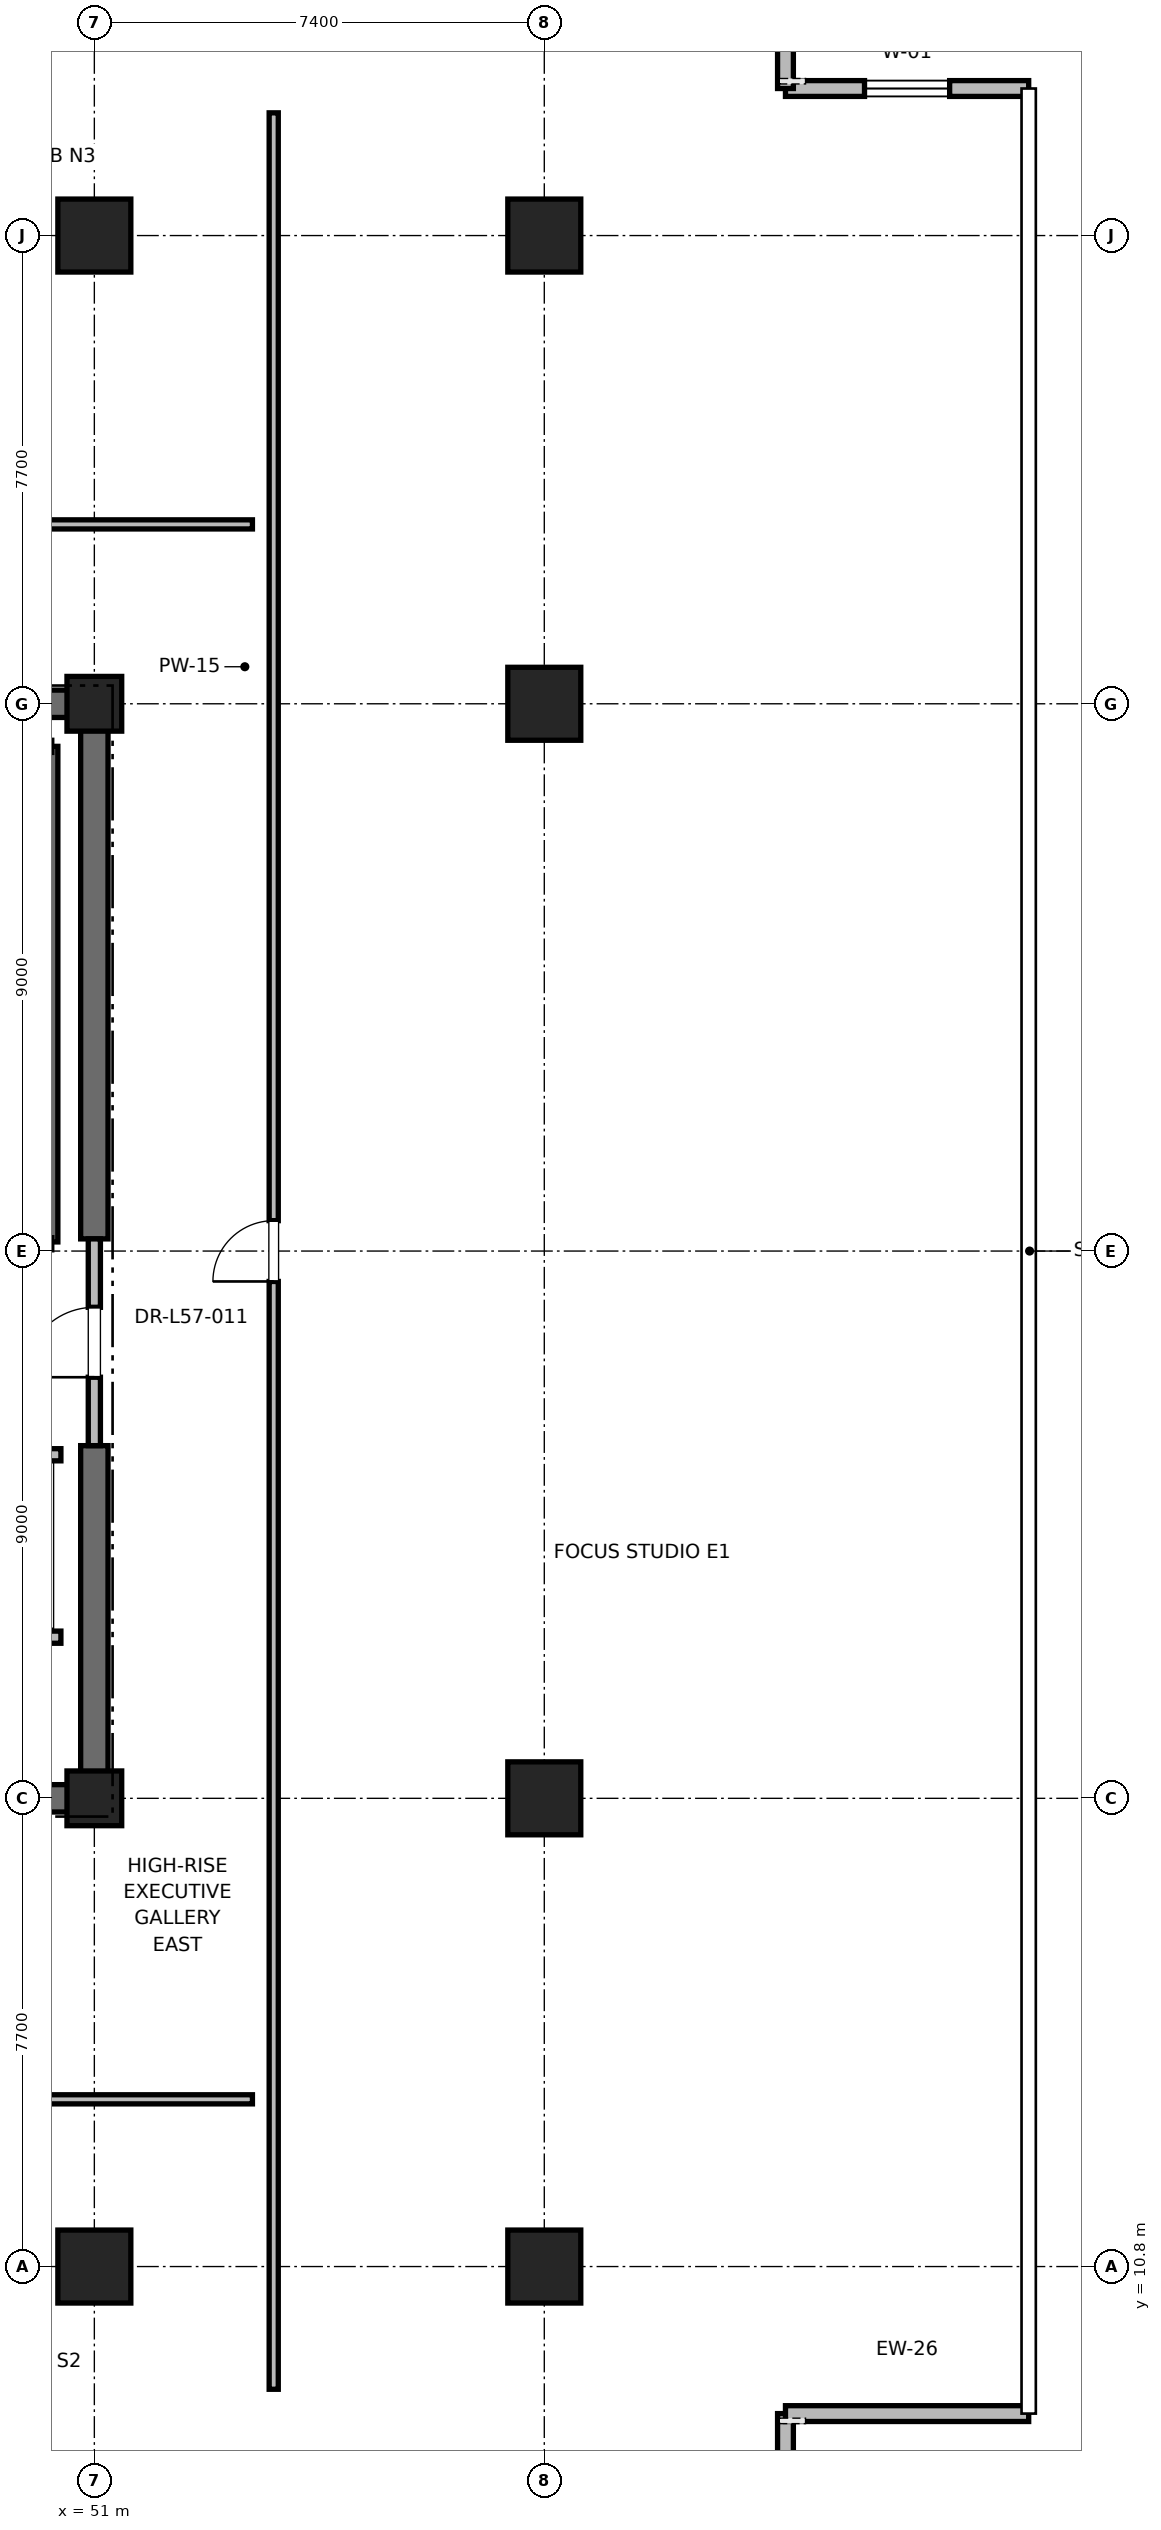
"""IFC4 building model, lengths in metres.
Left out: names, types, materials, properties, quantities, classifications, styles, units other than length and angle.
Written with IfcOpenShell. Run it as: python <this file> out.ifc"""

import sys

from ifc_helpers import new_model, si_unit, direction, frame, frame_2d, origin, origin_2d, place, context, subcontext, project, spatial, rectangle, extrude, element, fill, save


model = new_model("IFC4")
c1 = context("Model", 3, precision=1e-05, world=origin(), true_north=direction((0.0, 1.0)))
c2 = subcontext(c1, "Body", "Model", "MODEL_VIEW")
j1 = project(units=[si_unit("LENGTHUNIT", "METRE"), si_unit("PLANEANGLEUNIT", "RADIAN")], contexts=[c1])
p1 = place(None, origin())
s1 = spatial("IfcSite", under=j1, at=p1, CompositionType="ELEMENT")
p2 = place(p1, origin())
s2 = spatial("IfcBuilding", under=s1, at=p2, CompositionType="ELEMENT")
p3 = place(p2, frame((0.0, 0.0, 247.2)))
s3 = spatial("IfcBuildingStorey", under=s2, at=p3, CompositionType="ELEMENT", Elevation=247.2)
for number, where, z_axis, x_axis in (
    (1, (51.0, 10.8, 0.0), (0.0, 0.0, 1.0), (1.0, 0.0, 0.0)),
    (2, (51.0, 44.2, 0.0), (0.0, 0.0, 1.0), (1.0, 0.0, 0.0)),
    (3, (58.4, 18.5, 0.0), (0.0, 0.0, 1.0), (1.0, 0.0, 0.0)),
    (4, (58.4, 36.5, 0.0), (0.0, 0.0, 1.0), (1.0, 0.0, 0.0)),
    (5, (58.4, 10.8, 0.0), (0.0, 0.0, 1.0), (1.0, 0.0, 0.0)),
    (6, (58.4, 44.2, 0.0), (0.0, 0.0, 1.0), (1.0, 0.0, 0.0)),
):
    element("IfcColumn", number, at=place(p3, frame(where, z_axis=z_axis, x_axis=x_axis)), inside=s3, PredefinedType="COLUMN", context=c2, shape_type="SweptSolid", body=[
        extrude(rectangle(XDim=1.2, YDim=1.2, at=origin_2d()), origin(), (0.0, 0.0, 1.0), 4.0),
    ])
for number, where, z_axis, x_axis in (
    (7, (51.0, 18.5, 0.0), (0.0, 0.0, 1.0), (1.0, 0.0, 0.0)),
    (8, (51.0, 36.5, 0.0), (0.0, 0.0, 1.0), (1.0, 0.0, 0.0)),
):
    element("IfcColumn", number, at=place(p3, frame(where, z_axis=z_axis, x_axis=x_axis)), inside=s3, PredefinedType="PILASTER", context=c2, shape_type="SweptSolid", body=[
        extrude(rectangle(XDim=0.9, YDim=0.9, at=origin_2d()), origin(), (0.0, 0.0, 1.0), 4.0),
    ])
p4 = place(p3, frame((41.8, 18.5, 0.0), z_axis=(0.0, 0.0, 1.0), x_axis=(1.0, 0.0, 0.0)))
e9 = element("IfcWall", 9, at=p4, inside=s3, PredefinedType="SHEAR", context=c2, shape_type="SweptSolid", body=[
    extrude(rectangle(XDim=9.2, YDim=0.45, at=frame_2d((4.6, 0.0))), origin(), (0.0, 0.0, 1.0), 3.785),
])
for number, where, z_axis, x_axis in (
    (10, (45.2, 36.5, 0.0), (0.0, 0.0, 1.0), (1.0, 0.0, 0.0)),
    (11, (51.0, 18.5, 0.0), (0.0, 0.0, 1.0), (0.0, 1.0, 0.0)),
):
    element("IfcWall", number, at=place(p3, frame(where, z_axis=z_axis, x_axis=x_axis)), inside=s3, PredefinedType="SHEAR", context=c2, shape_type="SweptSolid", body=[
        extrude(rectangle(XDim=5.8, YDim=0.45, at=frame_2d((2.9, 0.0))), origin(), (0.0, 0.0, 1.0), 3.785),
    ])
p5 = place(p3, frame((51.0, 27.7, 0.0), z_axis=(0.0, 0.0, 1.0), x_axis=(0.0, 1.0, 0.0)))
e12 = element("IfcWall", 12, at=p5, inside=s3, PredefinedType="SHEAR", context=c2, shape_type="SweptSolid", body=[
    extrude(rectangle(XDim=8.8, YDim=0.45, at=frame_2d((4.4, 0.0))), origin(), (0.0, 0.0, 1.0), 3.785),
])
p6 = place(p3, frame((62.366, 4.882, 0.0), z_axis=(0.0, 0.0, 1.0), x_axis=(0.0, 1.0, 0.0)))
e13 = element("IfcWall", 13, at=p6, inside=s3, PredefinedType="PARAPET", context=c2, shape_type="SweptSolid", body=[
    extrude(rectangle(XDim=3.5, YDim=0.26, at=frame_2d((1.75, 0.0))), origin(), (0.0, 0.0, 1.0), 3.785),
])
p7 = place(p6, frame((1.05, 0.0, 0.85)))
e14 = element("IfcOpeningElement", 14, at=p7, cuts=e13, PredefinedType="OPENING", context=c2, shape_type="SweptSolid", body=[
    extrude(rectangle(XDim=1.4, YDim=2.0, at=frame_2d((0.7, 1.0))), frame((0.0, 0.13, 0.0), z_axis=(0.0, -1.0, 0.0), x_axis=(1.0, 0.0, 0.0)), (0.0, 0.0, 1.0), 0.26),
])
p8 = place(p3, frame((62.366, 8.382, 0.0), z_axis=(0.0, 0.0, 1.0), x_axis=(1.0, 0.0, 0.0)))
e15 = element("IfcWall", 15, at=p8, inside=s3, PredefinedType="PARAPET", context=c2, shape_type="SweptSolid", body=[
    extrude(rectangle(XDim=4.0, YDim=0.26, at=frame_2d((2.0, 0.0))), origin(), (0.0, 0.0, 1.0), 3.785),
])
p9 = place(p3, frame((66.366, 46.618, 0.0), z_axis=(0.0, 0.0, 1.0), x_axis=(-1.0, 0.0, 0.0)))
e16 = element("IfcWall", 16, at=p9, inside=s3, PredefinedType="PARAPET", context=c2, shape_type="SweptSolid", body=[
    extrude(rectangle(XDim=4.0, YDim=0.26, at=frame_2d((2.0, 0.0))), origin(), (0.0, 0.0, 1.0), 3.785),
])
p10 = place(p9, frame((1.3, 0.0, 0.85)))
e17 = element("IfcOpeningElement", 17, at=p10, cuts=e16, PredefinedType="OPENING", context=c2, shape_type="SweptSolid", body=[
    extrude(rectangle(XDim=1.4, YDim=2.0, at=frame_2d((0.7, 1.0))), frame((0.0, 0.13, 0.0), z_axis=(0.0, -1.0, 0.0), x_axis=(1.0, 0.0, 0.0)), (0.0, 0.0, 1.0), 0.26),
])
p11 = place(p3, frame((62.366, 46.618, 0.0), z_axis=(0.0, 0.0, 1.0), x_axis=(0.0, 1.0, 0.0)))
e18 = element("IfcWall", 18, at=p11, inside=s3, PredefinedType="PARAPET", context=c2, shape_type="SweptSolid", body=[
    extrude(rectangle(XDim=3.5, YDim=0.26, at=frame_2d((1.75, 0.0))), origin(), (0.0, 0.0, 1.0), 3.785),
])
p12 = place(p3, frame((50.3, 27.65, 0.0), z_axis=(0.0, 0.0, 1.0), x_axis=(0.0, 1.0, 0.0)))
e19 = element("IfcWall", 19, at=p12, inside=s3, PredefinedType="SOLIDWALL", context=c2, shape_type="SweptSolid", body=[
    extrude(rectangle(XDim=8.15, YDim=0.2, at=frame_2d((4.075, 0.0))), origin(), (0.0, 0.0, 1.0), 3.785),
])
p13 = place(p3, frame((51.0, 24.3, 0.0), z_axis=(0.0, 0.0, 1.0), x_axis=(0.0, 1.0, 0.0)))
e20 = element("IfcWall", 20, at=p13, inside=s3, PredefinedType="PARTITIONING", context=c2, shape_type="SweptSolid", body=[
    extrude(rectangle(XDim=3.4, YDim=0.2, at=frame_2d((1.7, 0.0))), origin(), (0.0, 0.0, 1.0), 2.865),
])
p14 = place(p13, frame((1.125, 0.0, 0.0)))
e21 = element("IfcOpeningElement", 21, at=p14, cuts=e20, PredefinedType="OPENING", context=c2, shape_type="SweptSolid", body=[
    extrude(rectangle(XDim=1.15, YDim=2.2, at=frame_2d((0.575, 1.1))), frame((0.0, 0.1, 0.0), z_axis=(0.0, -1.0, 0.0), x_axis=(1.0, 0.0, 0.0)), (0.0, 0.0, 1.0), 0.2),
])
p15 = place(p3, frame((47.85, 21.15, 0.0), z_axis=(0.0, 0.0, 1.0), x_axis=(1.0, 0.0, 0.0)))
e22 = element("IfcWall", 22, at=p15, inside=s3, PredefinedType="SOLIDWALL", context=c2, shape_type="SweptSolid", body=[
    extrude(rectangle(XDim=2.6, YDim=0.2, at=frame_2d((1.3, 0.0))), origin(), (0.0, 0.0, 1.0), 3.785),
])
p16 = place(p3, frame((50.45, 24.15, 0.0), z_axis=(0.0, 0.0, 1.0), x_axis=(-1.0, 0.0, 0.0)))
e23 = element("IfcWall", 23, at=p16, inside=s3, PredefinedType="SOLIDWALL", context=c2, shape_type="SweptSolid", body=[
    extrude(rectangle(XDim=2.6, YDim=0.2, at=frame_2d((1.3, 0.0))), origin(), (0.0, 0.0, 1.0), 2.865),
])
p17 = place(p16, frame((0.75, 0.0, 0.0)))
e24 = element("IfcOpeningElement", 24, at=p17, cuts=e23, PredefinedType="OPENING", context=c2, shape_type="SweptSolid", body=[
    extrude(rectangle(XDim=1.1, YDim=2.2, at=frame_2d((0.55, 1.1))), frame((0.0, 0.1, 0.0), z_axis=(0.0, -1.0, 0.0), x_axis=(1.0, 0.0, 0.0)), (0.0, 0.0, 1.0), 0.2),
])
p18 = place(p3, frame((44.422, 39.45, 0.0), z_axis=(0.0, 0.0, 1.0), x_axis=(1.0, 0.0, 0.0)))
e25 = element("IfcWall", 25, at=p18, inside=s3, PredefinedType="PARTITIONING", context=c2, shape_type="SweptSolid", body=[
    extrude(rectangle(XDim=9.178, YDim=0.15, at=frame_2d((4.589, 0.0))), origin(), (0.0, 0.0, 1.0), 2.85),
])
p19 = place(p18, frame((4.039, 0.0, 0.0)))
e26 = element("IfcOpeningElement", 26, at=p19, cuts=e25, PredefinedType="OPENING", context=c2, shape_type="SweptSolid", body=[
    extrude(rectangle(XDim=1.0, YDim=2.15, at=frame_2d((0.5, 1.075))), frame((0.0, 0.075, 0.0), z_axis=(0.0, -1.0, 0.0), x_axis=(1.0, 0.0, 0.0)), (0.0, 0.0, 1.0), 0.15),
])
p20 = place(p3, frame((38.71, 13.55, 0.0), z_axis=(0.0, 0.0, 1.0), x_axis=(1.0, 0.0, 0.0)))
e27 = element("IfcWall", 27, at=p20, inside=s3, PredefinedType="PARTITIONING", context=c2, shape_type="SweptSolid", body=[
    extrude(rectangle(XDim=14.89, YDim=0.15, at=frame_2d((7.445, 0.0))), origin(), (0.0, 0.0, 1.0), 2.85),
])
p21 = place(p20, frame((6.895, 0.0, 0.0)))
e28 = element("IfcOpeningElement", 28, at=p21, cuts=e27, PredefinedType="OPENING", context=c2, shape_type="SweptSolid", body=[
    extrude(rectangle(XDim=1.0, YDim=2.15, at=frame_2d((0.5, 1.075))), frame((0.0, 0.075, 0.0), z_axis=(0.0, -1.0, 0.0), x_axis=(1.0, 0.0, 0.0)), (0.0, 0.0, 1.0), 0.15),
])
p22 = place(p3, frame((53.95, 8.782, 0.0), z_axis=(0.0, 0.0, 1.0), x_axis=(0.0, 1.0, 0.0)))
e29 = element("IfcWall", 29, at=p22, inside=s3, PredefinedType="PARTITIONING", context=c2, shape_type="SweptSolid", body=[
    extrude(rectangle(XDim=37.437, YDim=0.15, at=frame_2d((18.718, 0.0))), origin(), (0.0, 0.0, 1.0), 2.85),
])
p23 = place(p22, frame((18.218, 0.0, 0.0)))
e30 = element("IfcOpeningElement", 30, at=p23, cuts=e29, PredefinedType="OPENING", context=c2, shape_type="SweptSolid", body=[
    extrude(rectangle(XDim=1.0, YDim=2.15, at=frame_2d((0.5, 1.075))), frame((0.0, 0.075, 0.0), z_axis=(0.0, -1.0, 0.0), x_axis=(1.0, 0.0, 0.0)), (0.0, 0.0, 1.0), 0.15),
])
p24 = place(p10, origin())
e31 = element("IfcWindow", 31, at=p24, inside=s3, PartitioningType="SINGLE_PANEL", PredefinedType="WINDOW", context=c2, shape_type="SweptSolid", body=[
    extrude(rectangle(XDim=1.4, YDim=2.0, at=frame_2d((0.7, 1.0))), frame((0.0, 0.03, 0.0), z_axis=(0.0, -1.0, 0.0), x_axis=(1.0, 0.0, 0.0)), (0.0, 0.0, 1.0), 0.06),
])
fill(e17, e31)
p25 = place(p14, origin())
e32 = element("IfcDoor", 32, at=p25, inside=s3, OperationType="SINGLE_SWING_LEFT", PredefinedType="DOOR", context=c2, shape_type="SweptSolid", body=[
    extrude(rectangle(XDim=1.15, YDim=2.2, at=frame_2d((0.575, 1.1))), frame((0.0, 0.025, 0.0), z_axis=(0.0, -1.0, 0.0), x_axis=(1.0, 0.0, 0.0)), (0.0, 0.0, 1.0), 0.05),
])
fill(e21, e32)
p26 = place(p23, origin())
e33 = element("IfcDoor", 33, at=p26, inside=s3, OperationType="SINGLE_SWING_LEFT", PredefinedType="DOOR", context=c2, shape_type="SweptSolid", body=[
    extrude(rectangle(XDim=1.0, YDim=2.15, at=frame_2d((0.5, 1.075))), frame((0.0, 0.025, 0.0), z_axis=(0.0, -1.0, 0.0), x_axis=(1.0, 0.0, 0.0)), (0.0, 0.0, 1.0), 0.05),
])
fill(e30, e33)
save(model, sys.argv[1])
